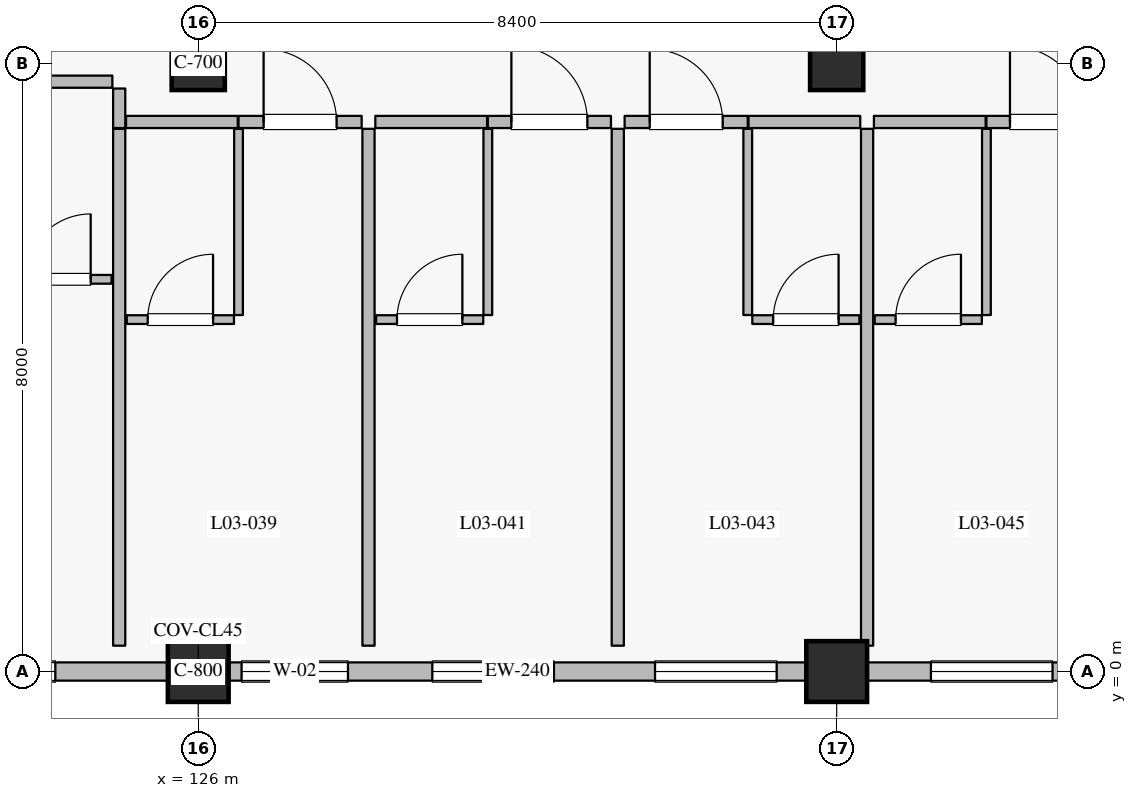
"""IFC4 building model, lengths in metres.
Left out: names, types, materials, properties, quantities, classifications, styles, units other than length and angle.
Written with IfcOpenShell. Run it as: python <this file> out.ifc"""

import sys

from ifc_helpers import new_model, si_unit, direction, frame, frame_2d, origin, origin_2d, place, context, subcontext, project, spatial, rectangle, extrude, element, fill, save


model = new_model("IFC4")
c1 = context("Model", 3, precision=1e-05, world=origin(), true_north=direction((0.0, 1.0)))
c2 = subcontext(c1, "Body", "Model", "MODEL_VIEW")
j1 = project(units=[si_unit("LENGTHUNIT", "METRE"), si_unit("PLANEANGLEUNIT", "RADIAN")], contexts=[c1])
p1 = place(None, origin())
s1 = spatial("IfcSite", under=j1, at=p1, CompositionType="ELEMENT")
p2 = place(p1, origin())
s2 = spatial("IfcBuilding", under=s1, at=p2, CompositionType="ELEMENT")
p3 = place(p2, frame((0.0, 0.0, 16.2)))
s3 = spatial("IfcBuildingStorey", under=s2, at=p3, CompositionType="ELEMENT", Elevation=16.2)
for number, where, z_axis, x_axis in (
    (1, (126.0, 0.0, 0.0), (0.0, 0.0, 1.0), (1.0, 0.0, 0.0)),
    (2, (134.4, 0.0, 0.0), (0.0, 0.0, 1.0), (1.0, 0.0, 0.0)),
):
    element("IfcColumn", number, at=place(p3, frame(where, z_axis=z_axis, x_axis=x_axis)), inside=s3, PredefinedType="COLUMN", context=c2, shape_type="SweptSolid", body=[
        extrude(rectangle(XDim=0.8, YDim=0.8, at=origin_2d()), origin(), (0.0, 0.0, 1.0), 4.8),
    ])
for number, where, z_axis, x_axis in (
    (3, (126.0, 8.0, 0.0), (0.0, 0.0, 1.0), (1.0, 0.0, 0.0)),
    (4, (134.4, 8.0, 0.0), (0.0, 0.0, 1.0), (1.0, 0.0, 0.0)),
):
    element("IfcColumn", number, at=place(p3, frame(where, z_axis=z_axis, x_axis=x_axis)), inside=s3, PredefinedType="COLUMN", context=c2, shape_type="SweptSolid", body=[
        extrude(rectangle(XDim=0.7, YDim=0.7, at=origin_2d()), origin(), (0.0, 0.0, 1.0), 4.8),
    ])
p4 = place(p3, frame((125.6, 0.0, 0.0), z_axis=(0.0, 0.0, 1.0), x_axis=(-1.0, 0.0, 0.0)))
e5 = element("IfcWall", 5, at=p4, inside=s3, PredefinedType="SOLIDWALL", context=c2, shape_type="SweptSolid", body=[
    extrude(rectangle(XDim=7.6, YDim=0.24, at=frame_2d((3.8, 0.0))), origin(), (0.0, 0.0, 1.0), 4.13),
])
p5 = place(p4, frame((1.48, 0.0, 0.8)))
e6 = element("IfcOpeningElement", 6, at=p5, cuts=e5, PredefinedType="OPENING", context=c2, shape_type="SweptSolid", body=[
    extrude(rectangle(XDim=1.6, YDim=1.6, at=frame_2d((0.8, 0.8))), frame((0.0, 0.13, 0.0), z_axis=(0.0, -1.0, 0.0), x_axis=(1.0, 0.0, 0.0)), (0.0, 0.0, 1.0), 0.26),
])
p6 = place(p4, frame((4.76, 0.0, 0.8)))
e7 = element("IfcOpeningElement", 7, at=p6, cuts=e5, PredefinedType="OPENING", context=c2, shape_type="SweptSolid", body=[
    extrude(rectangle(XDim=1.6, YDim=1.6, at=frame_2d((0.8, 0.8))), frame((0.0, 0.13, 0.0), z_axis=(0.0, -1.0, 0.0), x_axis=(1.0, 0.0, 0.0)), (0.0, 0.0, 1.0), 0.26),
])
p7 = place(p3, frame((134.0, 0.0, 0.0), z_axis=(0.0, 0.0, 1.0), x_axis=(-1.0, 0.0, 0.0)))
e8 = element("IfcWall", 8, at=p7, inside=s3, PredefinedType="SOLIDWALL", context=c2, shape_type="SweptSolid", body=[
    extrude(rectangle(XDim=7.6, YDim=0.24, at=frame_2d((3.8, 0.0))), origin(), (0.0, 0.0, 1.0), 4.13),
])
p8 = place(p7, frame((0.39, 0.0, 0.8)))
e9 = element("IfcOpeningElement", 9, at=p8, cuts=e8, PredefinedType="OPENING", context=c2, shape_type="SweptSolid", body=[
    extrude(rectangle(XDim=1.6, YDim=1.6, at=frame_2d((0.8, 0.8))), frame((0.0, 0.13, 0.0), z_axis=(0.0, -1.0, 0.0), x_axis=(1.0, 0.0, 0.0)), (0.0, 0.0, 1.0), 0.26),
])
p9 = place(p7, frame((3.32, 0.0, 0.8)))
e10 = element("IfcOpeningElement", 10, at=p9, cuts=e8, PredefinedType="OPENING", context=c2, shape_type="SweptSolid", body=[
    extrude(rectangle(XDim=1.6, YDim=1.6, at=frame_2d((0.8, 0.8))), frame((0.0, 0.13, 0.0), z_axis=(0.0, -1.0, 0.0), x_axis=(1.0, 0.0, 0.0)), (0.0, 0.0, 1.0), 0.26),
])
p10 = place(p7, frame((6.03, 0.0, 0.8)))
e11 = element("IfcOpeningElement", 11, at=p10, cuts=e8, PredefinedType="OPENING", context=c2, shape_type="SweptSolid", body=[
    extrude(rectangle(XDim=1.4, YDim=1.6, at=frame_2d((0.7, 0.8))), frame((0.0, 0.13, 0.0), z_axis=(0.0, -1.0, 0.0), x_axis=(1.0, 0.0, 0.0)), (0.0, 0.0, 1.0), 0.26),
])
p11 = place(p3, frame((142.4, 0.0, 0.0), z_axis=(0.0, 0.0, 1.0), x_axis=(-1.0, 0.0, 0.0)))
e12 = element("IfcWall", 12, at=p11, inside=s3, PredefinedType="SOLIDWALL", context=c2, shape_type="SweptSolid", body=[
    extrude(rectangle(XDim=7.6, YDim=0.24, at=frame_2d((3.8, 0.0))), origin(), (0.0, 0.0, 1.0), 4.13),
])
p12 = place(p11, frame((1.88, 0.0, 0.8)))
e13 = element("IfcOpeningElement", 13, at=p12, cuts=e12, PredefinedType="OPENING", context=c2, shape_type="SweptSolid", body=[
    extrude(rectangle(XDim=1.6, YDim=1.6, at=frame_2d((0.8, 0.8))), frame((0.0, 0.13, 0.0), z_axis=(0.0, -1.0, 0.0), x_axis=(1.0, 0.0, 0.0)), (0.0, 0.0, 1.0), 0.26),
])
p13 = place(p11, frame((5.16, 0.0, 0.8)))
e14 = element("IfcOpeningElement", 14, at=p13, cuts=e12, PredefinedType="OPENING", context=c2, shape_type="SweptSolid", body=[
    extrude(rectangle(XDim=1.6, YDim=1.6, at=frame_2d((0.8, 0.8))), frame((0.0, 0.13, 0.0), z_axis=(0.0, -1.0, 0.0), x_axis=(1.0, 0.0, 0.0)), (0.0, 0.0, 1.0), 0.26),
])
p14 = place(p3, frame((123.4, 7.76, 0.0), z_axis=(0.0, 0.0, 1.0), x_axis=(1.0, 0.0, 0.0)))
e15 = element("IfcWall", 15, at=p14, inside=s3, PredefinedType="PARTITIONING", context=c2, shape_type="SweptSolid", body=[
    extrude(rectangle(XDim=1.47, YDim=0.16, at=frame_2d((0.735, 0.0))), origin(), (0.0, 0.0, 1.0), 4.535),
])
p15 = place(p3, frame((123.45, 5.16, 0.0), z_axis=(0.0, 0.0, 1.0), x_axis=(1.0, 0.0, 0.0)))
e16 = element("IfcWall", 16, at=p15, inside=s3, PredefinedType="PARTITIONING", context=c2, shape_type="SweptSolid", body=[
    extrude(rectangle(XDim=1.41, YDim=0.115, at=frame_2d((0.705, 0.0))), origin(), (0.0, 0.0, 1.0), 4.535),
])
p16 = place(p15, frame((0.275, 0.0, 0.0)))
e17 = element("IfcOpeningElement", 17, at=p16, cuts=e16, PredefinedType="OPENING", context=c2, shape_type="SweptSolid", body=[
    extrude(rectangle(XDim=0.86, YDim=2.12, at=frame_2d((0.43, 1.06))), frame((0.0, 0.067, 0.0), z_axis=(0.0, -1.0, 0.0), x_axis=(1.0, 0.0, 0.0)), (0.0, 0.0, 1.0), 0.135),
])
p17 = place(p3, frame((124.96, 7.15, 0.0), z_axis=(0.0, 0.0, 1.0), x_axis=(0.0, 1.0, 0.0)))
e18 = element("IfcWall", 18, at=p17, inside=s3, PredefinedType="PARTITIONING", context=c2, shape_type="SweptSolid", body=[
    extrude(rectangle(XDim=0.52, YDim=0.16, at=frame_2d((0.26, 0.0))), origin(), (0.0, 0.0, 1.0), 4.535),
])
p18 = place(p3, frame((125.05, 7.23, 0.0), z_axis=(0.0, 0.0, 1.0), x_axis=(1.0, 0.0, 0.0)))
e19 = element("IfcWall", 19, at=p18, inside=s3, PredefinedType="PARTITIONING", context=c2, shape_type="SweptSolid", body=[
    extrude(rectangle(XDim=1.47, YDim=0.16, at=frame_2d((0.735, 0.0))), origin(), (0.0, 0.0, 1.0), 4.535),
])
p19 = place(p3, frame((126.53, 7.23, 0.0), z_axis=(0.0, 0.0, 1.0), x_axis=(1.0, 0.0, 0.0)))
e20 = element("IfcWall", 20, at=p19, inside=s3, PredefinedType="PARTITIONING", context=c2, shape_type="SweptSolid", body=[
    extrude(rectangle(XDim=1.62, YDim=0.16, at=frame_2d((0.81, 0.0))), origin(), (0.0, 0.0, 1.0), 4.535),
])
p20 = place(p19, frame((0.33, 0.0, 0.0)))
e21 = element("IfcOpeningElement", 21, at=p20, cuts=e20, PredefinedType="OPENING", context=c2, shape_type="SweptSolid", body=[
    extrude(rectangle(XDim=0.96, YDim=2.2, at=frame_2d((0.48, 1.1))), frame((0.0, 0.09, 0.0), z_axis=(0.0, -1.0, 0.0), x_axis=(1.0, 0.0, 0.0)), (0.0, 0.0, 1.0), 0.18),
])
p21 = place(p3, frame((126.53, 4.69, 0.0), z_axis=(0.0, 0.0, 1.0), x_axis=(0.0, 1.0, 0.0)))
e22 = element("IfcWall", 22, at=p21, inside=s3, PredefinedType="PARTITIONING", context=c2, shape_type="SweptSolid", body=[
    extrude(rectangle(XDim=2.45, YDim=0.115, at=frame_2d((1.225, 0.0))), origin(), (0.0, 0.0, 1.0), 4.535),
])
p22 = place(p3, frame((125.06, 4.63, 0.0), z_axis=(0.0, 0.0, 1.0), x_axis=(1.0, 0.0, 0.0)))
e23 = element("IfcWall", 23, at=p22, inside=s3, PredefinedType="PARTITIONING", context=c2, shape_type="SweptSolid", body=[
    extrude(rectangle(XDim=1.41, YDim=0.115, at=frame_2d((0.705, 0.0))), origin(), (0.0, 0.0, 1.0), 4.535),
])
p23 = place(p22, frame((0.275, 0.0, 0.0)))
e24 = element("IfcOpeningElement", 24, at=p23, cuts=e23, PredefinedType="OPENING", context=c2, shape_type="SweptSolid", body=[
    extrude(rectangle(XDim=0.86, YDim=2.12, at=frame_2d((0.43, 1.06))), frame((0.0, 0.067, 0.0), z_axis=(0.0, -1.0, 0.0), x_axis=(1.0, 0.0, 0.0)), (0.0, 0.0, 1.0), 0.135),
])
p24 = place(p3, frame((124.96, 0.34, 0.0), z_axis=(0.0, 0.0, 1.0), x_axis=(0.0, 1.0, 0.0)))
e25 = element("IfcWall", 25, at=p24, inside=s3, PredefinedType="PARTITIONING", context=c2, shape_type="SweptSolid", body=[
    extrude(rectangle(XDim=6.8, YDim=0.16, at=frame_2d((3.4, 0.0))), origin(), (0.0, 0.0, 1.0), 4.535),
])
p25 = place(p3, frame((128.33, 7.23, 0.0), z_axis=(0.0, 0.0, 1.0), x_axis=(1.0, 0.0, 0.0)))
e26 = element("IfcWall", 26, at=p25, inside=s3, PredefinedType="PARTITIONING", context=c2, shape_type="SweptSolid", body=[
    extrude(rectangle(XDim=1.47, YDim=0.16, at=frame_2d((0.735, 0.0))), origin(), (0.0, 0.0, 1.0), 4.535),
])
p26 = place(p3, frame((129.81, 7.23, 0.0), z_axis=(0.0, 0.0, 1.0), x_axis=(1.0, 0.0, 0.0)))
e27 = element("IfcWall", 27, at=p26, inside=s3, PredefinedType="PARTITIONING", context=c2, shape_type="SweptSolid", body=[
    extrude(rectangle(XDim=1.62, YDim=0.16, at=frame_2d((0.81, 0.0))), origin(), (0.0, 0.0, 1.0), 4.535),
])
p27 = place(p26, frame((0.31, 0.0, 0.0)))
e28 = element("IfcOpeningElement", 28, at=p27, cuts=e27, PredefinedType="OPENING", context=c2, shape_type="SweptSolid", body=[
    extrude(rectangle(XDim=1.0, YDim=2.25, at=frame_2d((0.5, 1.125))), frame((0.0, 0.09, 0.0), z_axis=(0.0, -1.0, 0.0), x_axis=(1.0, 0.0, 0.0)), (0.0, 0.0, 1.0), 0.18),
])
p28 = place(p3, frame((129.81, 4.69, 0.0), z_axis=(0.0, 0.0, 1.0), x_axis=(0.0, 1.0, 0.0)))
e29 = element("IfcWall", 29, at=p28, inside=s3, PredefinedType="PARTITIONING", context=c2, shape_type="SweptSolid", body=[
    extrude(rectangle(XDim=2.45, YDim=0.115, at=frame_2d((1.225, 0.0))), origin(), (0.0, 0.0, 1.0), 4.535),
])
p29 = place(p3, frame((128.34, 4.63, 0.0), z_axis=(0.0, 0.0, 1.0), x_axis=(1.0, 0.0, 0.0)))
e30 = element("IfcWall", 30, at=p29, inside=s3, PredefinedType="PARTITIONING", context=c2, shape_type="SweptSolid", body=[
    extrude(rectangle(XDim=1.41, YDim=0.115, at=frame_2d((0.705, 0.0))), origin(), (0.0, 0.0, 1.0), 4.535),
])
p30 = place(p29, frame((0.275, 0.0, 0.0)))
e31 = element("IfcOpeningElement", 31, at=p30, cuts=e30, PredefinedType="OPENING", context=c2, shape_type="SweptSolid", body=[
    extrude(rectangle(XDim=0.86, YDim=2.12, at=frame_2d((0.43, 1.06))), frame((0.0, 0.067, 0.0), z_axis=(0.0, -1.0, 0.0), x_axis=(1.0, 0.0, 0.0)), (0.0, 0.0, 1.0), 0.135),
])
p31 = place(p3, frame((128.24, 0.34, 0.0), z_axis=(0.0, 0.0, 1.0), x_axis=(0.0, 1.0, 0.0)))
e32 = element("IfcWall", 32, at=p31, inside=s3, PredefinedType="PARTITIONING", context=c2, shape_type="SweptSolid", body=[
    extrude(rectangle(XDim=6.8, YDim=0.16, at=frame_2d((3.4, 0.0))), origin(), (0.0, 0.0, 1.0), 4.535),
])
p32 = place(p3, frame((131.61, 7.23, 0.0), z_axis=(0.0, 0.0, 1.0), x_axis=(1.0, 0.0, 0.0)))
e33 = element("IfcWall", 33, at=p32, inside=s3, PredefinedType="PARTITIONING", context=c2, shape_type="SweptSolid", body=[
    extrude(rectangle(XDim=1.62, YDim=0.16, at=frame_2d((0.81, 0.0))), origin(), (0.0, 0.0, 1.0), 4.535),
])
p33 = place(p32, frame((0.33, 0.0, 0.0)))
e34 = element("IfcOpeningElement", 34, at=p33, cuts=e33, PredefinedType="OPENING", context=c2, shape_type="SweptSolid", body=[
    extrude(rectangle(XDim=0.96, YDim=2.2, at=frame_2d((0.48, 1.1))), frame((0.0, 0.09, 0.0), z_axis=(0.0, -1.0, 0.0), x_axis=(1.0, 0.0, 0.0)), (0.0, 0.0, 1.0), 0.18),
])
p34 = place(p3, frame((133.24, 7.23, 0.0), z_axis=(0.0, 0.0, 1.0), x_axis=(1.0, 0.0, 0.0)))
e35 = element("IfcWall", 35, at=p34, inside=s3, PredefinedType="PARTITIONING", context=c2, shape_type="SweptSolid", body=[
    extrude(rectangle(XDim=1.47, YDim=0.16, at=frame_2d((0.735, 0.0))), origin(), (0.0, 0.0, 1.0), 4.535),
])
p35 = place(p3, frame((133.23, 4.69, 0.0), z_axis=(0.0, 0.0, 1.0), x_axis=(0.0, 1.0, 0.0)))
e36 = element("IfcWall", 36, at=p35, inside=s3, PredefinedType="PARTITIONING", context=c2, shape_type="SweptSolid", body=[
    extrude(rectangle(XDim=2.45, YDim=0.115, at=frame_2d((1.225, 0.0))), origin(), (0.0, 0.0, 1.0), 4.535),
])
p36 = place(p3, frame((133.29, 4.63, 0.0), z_axis=(0.0, 0.0, 1.0), x_axis=(1.0, 0.0, 0.0)))
e37 = element("IfcWall", 37, at=p36, inside=s3, PredefinedType="PARTITIONING", context=c2, shape_type="SweptSolid", body=[
    extrude(rectangle(XDim=1.41, YDim=0.115, at=frame_2d((0.705, 0.0))), origin(), (0.0, 0.0, 1.0), 4.535),
])
p37 = place(p36, frame((0.275, 0.0, 0.0)))
e38 = element("IfcOpeningElement", 38, at=p37, cuts=e37, PredefinedType="OPENING", context=c2, shape_type="SweptSolid", body=[
    extrude(rectangle(XDim=0.86, YDim=2.12, at=frame_2d((0.43, 1.06))), frame((0.0, 0.067, 0.0), z_axis=(0.0, -1.0, 0.0), x_axis=(1.0, 0.0, 0.0)), (0.0, 0.0, 1.0), 0.135),
])
p38 = place(p3, frame((131.52, 0.34, 0.0), z_axis=(0.0, 0.0, 1.0), x_axis=(0.0, 1.0, 0.0)))
e39 = element("IfcWall", 39, at=p38, inside=s3, PredefinedType="PARTITIONING", context=c2, shape_type="SweptSolid", body=[
    extrude(rectangle(XDim=6.8, YDim=0.16, at=frame_2d((3.4, 0.0))), origin(), (0.0, 0.0, 1.0), 4.535),
])
p39 = place(p3, frame((134.89, 7.23, 0.0), z_axis=(0.0, 0.0, 1.0), x_axis=(1.0, 0.0, 0.0)))
e40 = element("IfcWall", 40, at=p39, inside=s3, PredefinedType="PARTITIONING", context=c2, shape_type="SweptSolid", body=[
    extrude(rectangle(XDim=1.47, YDim=0.16, at=frame_2d((0.735, 0.0))), origin(), (0.0, 0.0, 1.0), 4.535),
])
p40 = place(p3, frame((136.37, 7.23, 0.0), z_axis=(0.0, 0.0, 1.0), x_axis=(1.0, 0.0, 0.0)))
e41 = element("IfcWall", 41, at=p40, inside=s3, PredefinedType="PARTITIONING", context=c2, shape_type="SweptSolid", body=[
    extrude(rectangle(XDim=1.62, YDim=0.16, at=frame_2d((0.81, 0.0))), origin(), (0.0, 0.0, 1.0), 4.535),
])
p41 = place(p40, frame((0.31, 0.0, 0.0)))
e42 = element("IfcOpeningElement", 42, at=p41, cuts=e41, PredefinedType="OPENING", context=c2, shape_type="SweptSolid", body=[
    extrude(rectangle(XDim=1.0, YDim=2.25, at=frame_2d((0.5, 1.125))), frame((0.0, 0.09, 0.0), z_axis=(0.0, -1.0, 0.0), x_axis=(1.0, 0.0, 0.0)), (0.0, 0.0, 1.0), 0.18),
])
p42 = place(p3, frame((136.37, 4.69, 0.0), z_axis=(0.0, 0.0, 1.0), x_axis=(0.0, 1.0, 0.0)))
e43 = element("IfcWall", 43, at=p42, inside=s3, PredefinedType="PARTITIONING", context=c2, shape_type="SweptSolid", body=[
    extrude(rectangle(XDim=2.45, YDim=0.115, at=frame_2d((1.225, 0.0))), origin(), (0.0, 0.0, 1.0), 4.535),
])
p43 = place(p3, frame((134.9, 4.63, 0.0), z_axis=(0.0, 0.0, 1.0), x_axis=(1.0, 0.0, 0.0)))
e44 = element("IfcWall", 44, at=p43, inside=s3, PredefinedType="PARTITIONING", context=c2, shape_type="SweptSolid", body=[
    extrude(rectangle(XDim=1.41, YDim=0.115, at=frame_2d((0.705, 0.0))), origin(), (0.0, 0.0, 1.0), 4.535),
])
p44 = place(p43, frame((0.275, 0.0, 0.0)))
e45 = element("IfcOpeningElement", 45, at=p44, cuts=e44, PredefinedType="OPENING", context=c2, shape_type="SweptSolid", body=[
    extrude(rectangle(XDim=0.86, YDim=2.12, at=frame_2d((0.43, 1.06))), frame((0.0, 0.067, 0.0), z_axis=(0.0, -1.0, 0.0), x_axis=(1.0, 0.0, 0.0)), (0.0, 0.0, 1.0), 0.135),
])
p45 = place(p3, frame((134.8, 0.34, 0.0), z_axis=(0.0, 0.0, 1.0), x_axis=(0.0, 1.0, 0.0)))
e46 = element("IfcWall", 46, at=p45, inside=s3, PredefinedType="PARTITIONING", context=c2, shape_type="SweptSolid", body=[
    extrude(rectangle(XDim=6.8, YDim=0.16, at=frame_2d((3.4, 0.0))), origin(), (0.0, 0.0, 1.0), 4.535),
])
p46 = place(p5, origin())
e47 = element("IfcWindow", 47, at=p46, inside=s3, PartitioningType="SINGLE_PANEL", PredefinedType="WINDOW", context=c2, shape_type="SweptSolid", body=[
    extrude(rectangle(XDim=1.6, YDim=1.6, at=frame_2d((0.8, 0.8))), frame((0.0, 0.03, 0.0), z_axis=(0.0, -1.0, 0.0), x_axis=(1.0, 0.0, 0.0)), (0.0, 0.0, 1.0), 0.06),
])
fill(e6, e47)
p47 = place(p8, origin())
e48 = element("IfcWindow", 48, at=p47, inside=s3, PartitioningType="SINGLE_PANEL", PredefinedType="WINDOW", context=c2, shape_type="SweptSolid", body=[
    extrude(rectangle(XDim=1.6, YDim=1.6, at=frame_2d((0.8, 0.8))), frame((0.0, 0.03, 0.0), z_axis=(0.0, -1.0, 0.0), x_axis=(1.0, 0.0, 0.0)), (0.0, 0.0, 1.0), 0.06),
])
fill(e9, e48)
p48 = place(p9, origin())
e49 = element("IfcWindow", 49, at=p48, inside=s3, PartitioningType="SINGLE_PANEL", PredefinedType="WINDOW", context=c2, shape_type="SweptSolid", body=[
    extrude(rectangle(XDim=1.6, YDim=1.6, at=frame_2d((0.8, 0.8))), frame((0.0, 0.03, 0.0), z_axis=(0.0, -1.0, 0.0), x_axis=(1.0, 0.0, 0.0)), (0.0, 0.0, 1.0), 0.06),
])
fill(e10, e49)
p49 = place(p10, origin())
e50 = element("IfcWindow", 50, at=p49, inside=s3, PartitioningType="SINGLE_PANEL", PredefinedType="WINDOW", context=c2, shape_type="SweptSolid", body=[
    extrude(rectangle(XDim=1.4, YDim=1.6, at=frame_2d((0.7, 0.8))), frame((0.0, 0.03, 0.0), z_axis=(0.0, -1.0, 0.0), x_axis=(1.0, 0.0, 0.0)), (0.0, 0.0, 1.0), 0.06),
])
fill(e11, e50)
p50 = place(p13, origin())
e51 = element("IfcWindow", 51, at=p50, inside=s3, PartitioningType="SINGLE_PANEL", PredefinedType="WINDOW", context=c2, shape_type="SweptSolid", body=[
    extrude(rectangle(XDim=1.6, YDim=1.6, at=frame_2d((0.8, 0.8))), frame((0.0, 0.03, 0.0), z_axis=(0.0, -1.0, 0.0), x_axis=(1.0, 0.0, 0.0)), (0.0, 0.0, 1.0), 0.06),
])
fill(e14, e51)
p51 = place(p16, origin())
e52 = element("IfcDoor", 52, at=p51, inside=s3, OperationType="SINGLE_SWING_RIGHT", PredefinedType="DOOR", context=c2, shape_type="SweptSolid", body=[
    extrude(rectangle(XDim=0.86, YDim=2.12, at=frame_2d((0.43, 1.06))), frame((0.0, 0.025, 0.0), z_axis=(0.0, -1.0, 0.0), x_axis=(1.0, 0.0, 0.0)), (0.0, 0.0, 1.0), 0.05),
])
fill(e17, e52)
p52 = place(p20, origin())
e53 = element("IfcDoor", 53, at=p52, inside=s3, OperationType="SINGLE_SWING_LEFT", PredefinedType="DOOR", context=c2, shape_type="SweptSolid", body=[
    extrude(rectangle(XDim=0.96, YDim=2.2, at=frame_2d((0.48, 1.1))), frame((0.0, 0.025, 0.0), z_axis=(0.0, -1.0, 0.0), x_axis=(1.0, 0.0, 0.0)), (0.0, 0.0, 1.0), 0.05),
])
fill(e21, e53)
p53 = place(p23, origin())
e54 = element("IfcDoor", 54, at=p53, inside=s3, OperationType="SINGLE_SWING_RIGHT", PredefinedType="DOOR", context=c2, shape_type="SweptSolid", body=[
    extrude(rectangle(XDim=0.86, YDim=2.12, at=frame_2d((0.43, 1.06))), frame((0.0, 0.025, 0.0), z_axis=(0.0, -1.0, 0.0), x_axis=(1.0, 0.0, 0.0)), (0.0, 0.0, 1.0), 0.05),
])
fill(e24, e54)
p54 = place(p27, origin())
e55 = element("IfcDoor", 55, at=p54, inside=s3, OperationType="SINGLE_SWING_LEFT", PredefinedType="DOOR", context=c2, shape_type="SweptSolid", body=[
    extrude(rectangle(XDim=1.0, YDim=2.25, at=frame_2d((0.5, 1.125))), frame((0.0, 0.025, 0.0), z_axis=(0.0, -1.0, 0.0), x_axis=(1.0, 0.0, 0.0)), (0.0, 0.0, 1.0), 0.05),
])
fill(e28, e55)
p55 = place(p30, origin())
e56 = element("IfcDoor", 56, at=p55, inside=s3, OperationType="SINGLE_SWING_RIGHT", PredefinedType="DOOR", context=c2, shape_type="SweptSolid", body=[
    extrude(rectangle(XDim=0.86, YDim=2.12, at=frame_2d((0.43, 1.06))), frame((0.0, 0.025, 0.0), z_axis=(0.0, -1.0, 0.0), x_axis=(1.0, 0.0, 0.0)), (0.0, 0.0, 1.0), 0.05),
])
fill(e31, e56)
p56 = place(p33, origin())
e57 = element("IfcDoor", 57, at=p56, inside=s3, OperationType="SINGLE_SWING_LEFT", PredefinedType="DOOR", context=c2, shape_type="SweptSolid", body=[
    extrude(rectangle(XDim=0.96, YDim=2.2, at=frame_2d((0.48, 1.1))), frame((0.0, 0.025, 0.0), z_axis=(0.0, -1.0, 0.0), x_axis=(1.0, 0.0, 0.0)), (0.0, 0.0, 1.0), 0.05),
])
fill(e34, e57)
p57 = place(p37, origin())
e58 = element("IfcDoor", 58, at=p57, inside=s3, OperationType="SINGLE_SWING_RIGHT", PredefinedType="DOOR", context=c2, shape_type="SweptSolid", body=[
    extrude(rectangle(XDim=0.86, YDim=2.12, at=frame_2d((0.43, 1.06))), frame((0.0, 0.025, 0.0), z_axis=(0.0, -1.0, 0.0), x_axis=(1.0, 0.0, 0.0)), (0.0, 0.0, 1.0), 0.05),
])
fill(e38, e58)
p58 = place(p41, origin())
e59 = element("IfcDoor", 59, at=p58, inside=s3, OperationType="SINGLE_SWING_LEFT", PredefinedType="DOOR", context=c2, shape_type="SweptSolid", body=[
    extrude(rectangle(XDim=1.0, YDim=2.25, at=frame_2d((0.5, 1.125))), frame((0.0, 0.025, 0.0), z_axis=(0.0, -1.0, 0.0), x_axis=(1.0, 0.0, 0.0)), (0.0, 0.0, 1.0), 0.05),
])
fill(e42, e59)
p59 = place(p44, origin())
e60 = element("IfcDoor", 60, at=p59, inside=s3, OperationType="SINGLE_SWING_RIGHT", PredefinedType="DOOR", context=c2, shape_type="SweptSolid", body=[
    extrude(rectangle(XDim=0.86, YDim=2.12, at=frame_2d((0.43, 1.06))), frame((0.0, 0.025, 0.0), z_axis=(0.0, -1.0, 0.0), x_axis=(1.0, 0.0, 0.0)), (0.0, 0.0, 1.0), 0.05),
])
fill(e45, e60)
save(model, sys.argv[1])
